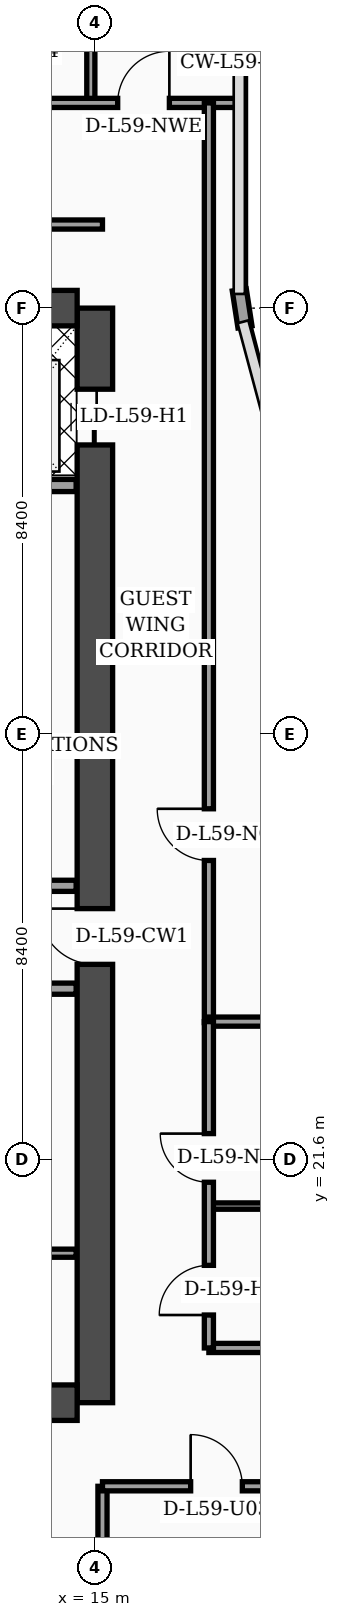
"""IFC4 building model, lengths in metres.
Left out: names, types, materials, properties, quantities, classifications, styles, units other than length and angle.
Written with IfcOpenShell. Run it as: python <this file> out.ifc"""

import sys

from ifc_helpers import new_model, si_unit, direction, frame, frame_2d, origin, place, context, subcontext, project, spatial, rectangle, extrude, element, fill, save


model = new_model("IFC4")
c1 = context("Model", 3, precision=1e-05, world=origin(), true_north=direction((0.0, 1.0)))
c2 = subcontext(c1, "Body", "Model", "MODEL_VIEW")
j1 = project(units=[si_unit("LENGTHUNIT", "METRE"), si_unit("PLANEANGLEUNIT", "RADIAN")], contexts=[c1])
p1 = place(None, origin())
s1 = spatial("IfcSite", under=j1, at=p1, CompositionType="ELEMENT")
p2 = place(p1, origin())
s2 = spatial("IfcBuilding", under=s1, at=p2, CompositionType="ELEMENT")
p3 = place(p2, frame((0.0, 0.0, 239.3)))
s3 = spatial("IfcBuildingStorey", under=s2, at=p3, CompositionType="ELEMENT", Elevation=239.3)
p4 = place(p3, frame((15.0, 16.8, 0.0), z_axis=(0.0, 0.0, 1.0), x_axis=(0.0, 1.0, 0.0)))
e1 = element("IfcWall", 1, at=p4, inside=s3, PredefinedType="SHEAR", context=c2, shape_type="SweptSolid", body=[
    extrude(rectangle(XDim=21.6, YDim=0.7, at=frame_2d((10.8, 0.0))), origin(), (0.0, 0.0, 1.0), 4.05),
])
p5 = place(p4, frame((8.65, 0.0, 0.0)))
e2 = element("IfcOpeningElement", 2, at=p5, cuts=e1, PredefinedType="OPENING", context=c2, shape_type="SweptSolid", body=[
    extrude(rectangle(XDim=1.1, YDim=2.2, at=frame_2d((0.55, 1.1))), frame((0.0, 0.36, 0.0), z_axis=(0.0, -1.0, 0.0), x_axis=(1.0, 0.0, 0.0)), (0.0, 0.0, 1.0), 0.72),
])
p6 = place(p4, frame((18.9, 0.0, 0.0)))
e3 = element("IfcOpeningElement", 3, at=p6, cuts=e1, PredefinedType="OPENING", context=c2, shape_type="SweptSolid", body=[
    extrude(rectangle(XDim=1.1, YDim=2.2, at=frame_2d((0.55, 1.1))), frame((0.0, 0.36, 0.0), z_axis=(0.0, -1.0, 0.0), x_axis=(1.0, 0.0, 0.0)), (0.0, 0.0, 1.0), 0.72),
])
p7 = place(p3, frame((4.55, 38.4, 0.0), z_axis=(0.0, 0.0, 1.0), x_axis=(1.0, 0.0, 0.0)))
e4 = element("IfcWall", 4, at=p7, inside=s3, PredefinedType="SHEAR", context=c2, shape_type="SweptSolid", body=[
    extrude(rectangle(XDim=10.1, YDim=0.7, at=frame_2d((5.05, 0.0))), origin(), (0.0, 0.0, 1.0), 4.05),
])
p8 = place(p7, frame((5.75, 0.0, 0.0)))
e5 = element("IfcOpeningElement", 5, at=p8, cuts=e4, PredefinedType="OPENING", context=c2, shape_type="SweptSolid", body=[
    extrude(rectangle(XDim=1.1, YDim=2.2, at=frame_2d((0.55, 1.1))), frame((0.0, 0.36, 0.0), z_axis=(0.0, -1.0, 0.0), x_axis=(1.0, 0.0, 0.0)), (0.0, 0.0, 1.0), 0.72),
])
p9 = place(p3, frame((4.55, 16.8, 0.0), z_axis=(0.0, 0.0, 1.0), x_axis=(1.0, 0.0, 0.0)))
e6 = element("IfcWall", 6, at=p9, inside=s3, PredefinedType="SHEAR", context=c2, shape_type="SweptSolid", body=[
    extrude(rectangle(XDim=10.1, YDim=0.7, at=frame_2d((5.05, 0.0))), origin(), (0.0, 0.0, 1.0), 4.05),
])
p10 = place(p3, frame((17.962, 38.03, 0.0), z_axis=(0.0, 0.0, 1.0), x_axis=(-0.15141125477, 0.988470855377, 0.0)))
e7 = element("IfcWall", 7, at=p10, inside=s3, PredefinedType="SOLIDWALL", context=c2, shape_type="SweptSolid", body=[
    extrude(rectangle(XDim=0.739, YDim=0.28, at=frame_2d((0.369, 0.0))), origin(), (0.0, 0.0, 1.0), 4.05),
])
p11 = place(p3, frame((9.68, 19.75, 0.0), z_axis=(0.0, 0.0, 1.0), x_axis=(1.0, 0.0, 0.0)))
e8 = element("IfcWall", 8, at=p11, inside=s3, PredefinedType="PARTITIONING", context=c2, shape_type="SweptSolid", body=[
    extrude(rectangle(XDim=4.95, YDim=0.16, at=frame_2d((2.475, 0.0))), origin(), (0.0, 0.0, 1.0), 4.05),
])
p12 = place(p11, frame((1.1, 0.0, 0.0)))
e9 = element("IfcOpeningElement", 9, at=p12, cuts=e8, PredefinedType="OPENING", context=c2, shape_type="SweptSolid", body=[
    extrude(rectangle(XDim=0.98, YDim=2.15, at=frame_2d((0.49, 1.075))), frame((0.0, 0.09, 0.0), z_axis=(0.0, -1.0, 0.0), x_axis=(1.0, 0.0, 0.0)), (0.0, 0.0, 1.0), 0.18),
])
p13 = place(p3, frame((9.68, 24.97, 0.0), z_axis=(0.0, 0.0, 1.0), x_axis=(1.0, 0.0, 0.0)))
e10 = element("IfcWall", 10, at=p13, inside=s3, PredefinedType="SOLIDWALL", context=c2, shape_type="SweptSolid", body=[
    extrude(rectangle(XDim=4.95, YDim=0.22, at=frame_2d((2.475, 0.0))), origin(), (0.0, 0.0, 1.0), 3.5),
])
p14 = place(p13, frame((0.9, 0.0, 0.0)))
e11 = element("IfcOpeningElement", 11, at=p14, cuts=e10, PredefinedType="OPENING", context=c2, shape_type="SweptSolid", body=[
    extrude(rectangle(XDim=0.98, YDim=2.15, at=frame_2d((0.49, 1.075))), frame((0.0, 0.12, 0.0), z_axis=(0.0, -1.0, 0.0), x_axis=(1.0, 0.0, 0.0)), (0.0, 0.0, 1.0), 0.24),
])
p15 = place(p3, frame((12.25, 27.0, 0.0), z_axis=(0.0, 0.0, 1.0), x_axis=(1.0, 0.0, 0.0)))
e12 = element("IfcWall", 12, at=p15, inside=s3, PredefinedType="SOLIDWALL", context=c2, shape_type="SweptSolid", body=[
    extrude(rectangle(XDim=2.38, YDim=0.22, at=frame_2d((1.19, 0.0))), origin(), (0.0, 0.0, 1.0), 4.05),
])
p16 = place(p3, frame((12.25, 29.8, 0.0), z_axis=(0.0, 0.0, 1.0), x_axis=(1.0, 0.0, 0.0)))
e13 = element("IfcWall", 13, at=p16, inside=s3, PredefinedType="PARTITIONING", context=c2, shape_type="SweptSolid", body=[
    extrude(rectangle(XDim=2.38, YDim=0.16, at=frame_2d((1.19, 0.0))), origin(), (0.0, 0.0, 1.0), 4.05),
])
p17 = place(p16, frame((0.55, 0.0, 0.0)))
e14 = element("IfcOpeningElement", 14, at=p17, cuts=e13, PredefinedType="OPENING", context=c2, shape_type="SweptSolid", body=[
    extrude(rectangle(XDim=0.98, YDim=2.15, at=frame_2d((0.49, 1.075))), frame((0.0, 0.09, 0.0), z_axis=(0.0, -1.0, 0.0), x_axis=(1.0, 0.0, 0.0)), (0.0, 0.0, 1.0), 0.18),
])
p18 = place(p3, frame((9.66, 34.9, 0.0), z_axis=(0.0, 0.0, 1.0), x_axis=(1.0, 0.0, 0.0)))
e15 = element("IfcWall", 15, at=p18, inside=s3, PredefinedType="SOLIDWALL", context=c2, shape_type="SweptSolid", body=[
    extrude(rectangle(XDim=4.97, YDim=0.24, at=frame_2d((2.485, 0.0))), origin(), (0.0, 0.0, 1.0), 4.05),
])
p19 = place(p3, frame((15.15, 2.44, 0.0), z_axis=(0.0, 0.0, 1.0), x_axis=(0.0, 1.0, 0.0)))
e16 = element("IfcWall", 16, at=p19, inside=s3, PredefinedType="PARTITIONING", context=c2, shape_type="SweptSolid", body=[
    extrude(rectangle(XDim=12.71, YDim=0.18, at=frame_2d((6.355, 0.0))), origin(), (0.0, 0.0, 1.0), 2.35),
])
p20 = place(p3, frame((15.15, 15.15, 0.0), z_axis=(0.0, 0.0, 1.0), x_axis=(1.0, 0.0, 0.0)))
e17 = element("IfcWall", 17, at=p20, inside=s3, PredefinedType="PARTITIONING", context=c2, shape_type="SweptSolid", body=[
    extrude(rectangle(XDim=6.45, YDim=0.18, at=frame_2d((3.225, 0.0))), origin(), (0.0, 0.0, 1.0), 2.35),
])
p21 = place(p20, frame((1.74, 0.0, 0.0)))
e18 = element("IfcOpeningElement", 18, at=p21, cuts=e17, PredefinedType="OPENING", context=c2, shape_type="SweptSolid", body=[
    extrude(rectangle(XDim=1.02, YDim=2.2, at=frame_2d((0.51, 1.1))), frame((0.0, 0.1, 0.0), z_axis=(0.0, -1.0, 0.0), x_axis=(1.0, 0.0, 0.0)), (0.0, 0.0, 1.0), 0.2),
])
p22 = place(p3, frame((14.92, 42.45, 0.0), z_axis=(0.0, 0.0, 1.0), x_axis=(0.0, 1.0, 0.0)))
e19 = element("IfcWall", 19, at=p22, inside=s3, PredefinedType="PARTITIONING", context=c2, shape_type="SweptSolid", body=[
    extrude(rectangle(XDim=5.35, YDim=0.16, at=frame_2d((2.675, 0.0))), origin(), (0.0, 0.0, 1.0), 3.6),
])
p23 = place(p3, frame((0.08, 42.45, 0.0), z_axis=(0.0, 0.0, 1.0), x_axis=(1.0, 0.0, 0.0)))
e20 = element("IfcWall", 20, at=p23, inside=s3, PredefinedType="PARTITIONING", context=c2, shape_type="SweptSolid", body=[
    extrude(rectangle(XDim=17.77, YDim=0.18, at=frame_2d((8.885, 0.0))), origin(), (0.0, 0.0, 1.0), 3.5),
])
p24 = place(p23, frame((0.9, 0.0, 0.0)))
e21 = element("IfcOpeningElement", 21, at=p24, cuts=e20, PredefinedType="OPENING", context=c2, shape_type="SweptSolid", body=[
    extrude(rectangle(XDim=1.02, YDim=2.2, at=frame_2d((0.51, 1.1))), frame((0.0, 0.1, 0.0), z_axis=(0.0, -1.0, 0.0), x_axis=(1.0, 0.0, 0.0)), (0.0, 0.0, 1.0), 0.2),
])
p25 = place(p23, frame((7.38, 0.0, 0.0)))
e22 = element("IfcOpeningElement", 22, at=p25, cuts=e20, PredefinedType="OPENING", context=c2, shape_type="SweptSolid", body=[
    extrude(rectangle(XDim=1.02, YDim=2.2, at=frame_2d((0.51, 1.1))), frame((0.0, 0.1, 0.0), z_axis=(0.0, -1.0, 0.0), x_axis=(1.0, 0.0, 0.0)), (0.0, 0.0, 1.0), 0.2),
])
p26 = place(p23, frame((15.37, 0.0, 0.0)))
e23 = element("IfcOpeningElement", 23, at=p26, cuts=e20, PredefinedType="OPENING", context=c2, shape_type="SweptSolid", body=[
    extrude(rectangle(XDim=1.02, YDim=2.2, at=frame_2d((0.51, 1.1))), frame((0.0, 0.1, 0.0), z_axis=(0.0, -1.0, 0.0), x_axis=(1.0, 0.0, 0.0)), (0.0, 0.0, 1.0), 0.2),
])
p27 = place(p3, frame((17.25, 24.3, 0.0), z_axis=(0.0, 0.0, 1.0), x_axis=(0.0, 1.0, 0.0)))
e24 = element("IfcWall", 24, at=p27, inside=s3, PredefinedType="PARTITIONING", context=c2, shape_type="SweptSolid", body=[
    extrude(rectangle(XDim=18.15, YDim=0.18, at=frame_2d((9.075, 0.0))), origin(), (0.0, 0.0, 1.0), 3.5),
])
p28 = place(p27, frame((3.2, 0.0, 0.0)))
e25 = element("IfcOpeningElement", 25, at=p28, cuts=e24, PredefinedType="OPENING", context=c2, shape_type="SweptSolid", body=[
    extrude(rectangle(XDim=1.02, YDim=2.2, at=frame_2d((0.51, 1.1))), frame((0.0, 0.1, 0.0), z_axis=(0.0, -1.0, 0.0), x_axis=(1.0, 0.0, 0.0)), (0.0, 0.0, 1.0), 0.2),
])
p29 = place(p3, frame((3.83, 40.05, 0.0), z_axis=(0.0, 0.0, 1.0), x_axis=(1.0, 0.0, 0.0)))
e26 = element("IfcWall", 26, at=p29, inside=s3, PredefinedType="PARTITIONING", context=c2, shape_type="SweptSolid", body=[
    extrude(rectangle(XDim=11.32, YDim=0.18, at=frame_2d((5.66, 0.0))), origin(), (0.0, 0.0, 1.0), 3.5),
])
p30 = place(p3, frame((17.25, 17.88, 0.0), z_axis=(0.0, 0.0, 1.0), x_axis=(1.0, 0.0, 0.0)))
e27 = element("IfcWall", 27, at=p30, inside=s3, PredefinedType="PARTITIONING", context=c2, shape_type="SweptSolid", body=[
    extrude(rectangle(XDim=4.3, YDim=0.18, at=frame_2d((2.15, 0.0))), origin(), (0.0, 0.0, 1.0), 4.05),
])
p31 = place(p3, frame((17.25, 20.68, 0.0), z_axis=(0.0, 0.0, 1.0), x_axis=(1.0, 0.0, 0.0)))
e28 = element("IfcWall", 28, at=p31, inside=s3, PredefinedType="PARTITIONING", context=c2, shape_type="SweptSolid", body=[
    extrude(rectangle(XDim=4.3, YDim=0.125, at=frame_2d((2.15, 0.0))), origin(), (0.0, 0.0, 1.0), 4.05),
])
p32 = place(p3, frame((17.25, 24.32, 0.0), z_axis=(0.0, 0.0, 1.0), x_axis=(1.0, 0.0, 0.0)))
e29 = element("IfcWall", 29, at=p32, inside=s3, PredefinedType="PARTITIONING", context=c2, shape_type="SweptSolid", body=[
    extrude(rectangle(XDim=4.35, YDim=0.18, at=frame_2d((2.175, 0.0))), origin(), (0.0, 0.0, 1.0), 4.05),
])
p33 = place(p3, frame((17.25, 17.88, 0.0), z_axis=(0.0, 0.0, 1.0), x_axis=(0.0, 1.0, 0.0)))
e30 = element("IfcWall", 30, at=p33, inside=s3, PredefinedType="PARTITIONING", context=c2, shape_type="SweptSolid", body=[
    extrude(rectangle(XDim=6.44, YDim=0.18, at=frame_2d((3.22, 0.0))), origin(), (0.0, 0.0, 1.0), 4.05),
])
p34 = place(p33, frame((0.65, 0.0, 0.0)))
e31 = element("IfcOpeningElement", 31, at=p34, cuts=e30, PredefinedType="OPENING", context=c2, shape_type="SweptSolid", body=[
    extrude(rectangle(XDim=0.98, YDim=2.15, at=frame_2d((0.49, 1.075))), frame((0.0, 0.1, 0.0), z_axis=(0.0, -1.0, 0.0), x_axis=(1.0, 0.0, 0.0)), (0.0, 0.0, 1.0), 0.2),
])
p35 = place(p33, frame((3.27, 0.0, 0.0)))
e32 = element("IfcOpeningElement", 32, at=p35, cuts=e30, PredefinedType="OPENING", context=c2, shape_type="SweptSolid", body=[
    extrude(rectangle(XDim=0.96, YDim=2.2, at=frame_2d((0.48, 1.1))), frame((0.0, 0.1, 0.0), z_axis=(0.0, -1.0, 0.0), x_axis=(1.0, 0.0, 0.0)), (0.0, 0.0, 1.0), 0.2),
])
p36 = place(p21, origin())
e33 = element("IfcDoor", 33, at=p36, inside=s3, OperationType="SINGLE_SWING_LEFT", PredefinedType="DOOR", context=c2, shape_type="SweptSolid", body=[
    extrude(rectangle(XDim=1.02, YDim=2.2, at=frame_2d((0.51, 1.1))), frame((0.0, 0.025, 0.0), z_axis=(0.0, -1.0, 0.0), x_axis=(1.0, 0.0, 0.0)), (0.0, 0.0, 1.0), 0.05),
])
fill(e18, e33)
p37 = place(p26, origin())
e34 = element("IfcDoor", 34, at=p37, inside=s3, OperationType="SINGLE_SWING_RIGHT", PredefinedType="DOOR", context=c2, shape_type="SweptSolid", body=[
    extrude(rectangle(XDim=1.02, YDim=2.2, at=frame_2d((0.51, 1.1))), frame((0.0, 0.025, 0.0), z_axis=(0.0, -1.0, 0.0), x_axis=(1.0, 0.0, 0.0)), (0.0, 0.0, 1.0), 0.05),
])
fill(e23, e34)
p38 = place(p28, origin())
e35 = element("IfcDoor", 35, at=p38, inside=s3, OperationType="SINGLE_SWING_RIGHT", PredefinedType="DOOR", context=c2, shape_type="SweptSolid", body=[
    extrude(rectangle(XDim=1.02, YDim=2.2, at=frame_2d((0.51, 1.1))), frame((0.0, 0.025, 0.0), z_axis=(0.0, -1.0, 0.0), x_axis=(1.0, 0.0, 0.0)), (0.0, 0.0, 1.0), 0.05),
])
fill(e25, e35)
p39 = place(p34, origin())
e36 = element("IfcDoor", 36, at=p39, inside=s3, OperationType="SINGLE_SWING_LEFT", PredefinedType="DOOR", context=c2, shape_type="SweptSolid", body=[
    extrude(rectangle(XDim=0.98, YDim=2.15, at=frame_2d((0.49, 1.075))), frame((0.0, 0.025, 0.0), z_axis=(0.0, -1.0, 0.0), x_axis=(1.0, 0.0, 0.0)), (0.0, 0.0, 1.0), 0.05),
])
fill(e31, e36)
p40 = place(p35, origin())
e37 = element("IfcDoor", 37, at=p40, inside=s3, OperationType="SINGLE_SWING_RIGHT", PredefinedType="DOOR", context=c2, shape_type="SweptSolid", body=[
    extrude(rectangle(XDim=0.96, YDim=2.2, at=frame_2d((0.48, 1.1))), frame((0.0, 0.025, 0.0), z_axis=(0.0, -1.0, 0.0), x_axis=(1.0, 0.0, 0.0)), (0.0, 0.0, 1.0), 0.05),
])
fill(e32, e37)
p41 = place(p5, origin())
e38 = element("IfcDoor", 38, at=p41, inside=s3, OperationType="SINGLE_SWING_RIGHT", PredefinedType="DOOR", context=c2, shape_type="SweptSolid", body=[
    extrude(rectangle(XDim=1.1, YDim=2.2, at=frame_2d((0.55, 1.1))), frame((0.0, 0.025, 0.0), z_axis=(0.0, -1.0, 0.0), x_axis=(1.0, 0.0, 0.0)), (0.0, 0.0, 1.0), 0.05),
])
fill(e2, e38)
p42 = place(p6, origin())
e39 = element("IfcDoor", 39, at=p42, inside=s3, OperationType="DOUBLE_DOOR_SLIDING", PredefinedType="DOOR", context=c2, shape_type="SweptSolid", body=[
    extrude(rectangle(XDim=1.1, YDim=2.2, at=frame_2d((0.55, 1.1))), frame((0.0, 0.025, 0.0), z_axis=(0.0, -1.0, 0.0), x_axis=(1.0, 0.0, 0.0)), (0.0, 0.0, 1.0), 0.05),
])
fill(e3, e39)
save(model, sys.argv[1])
